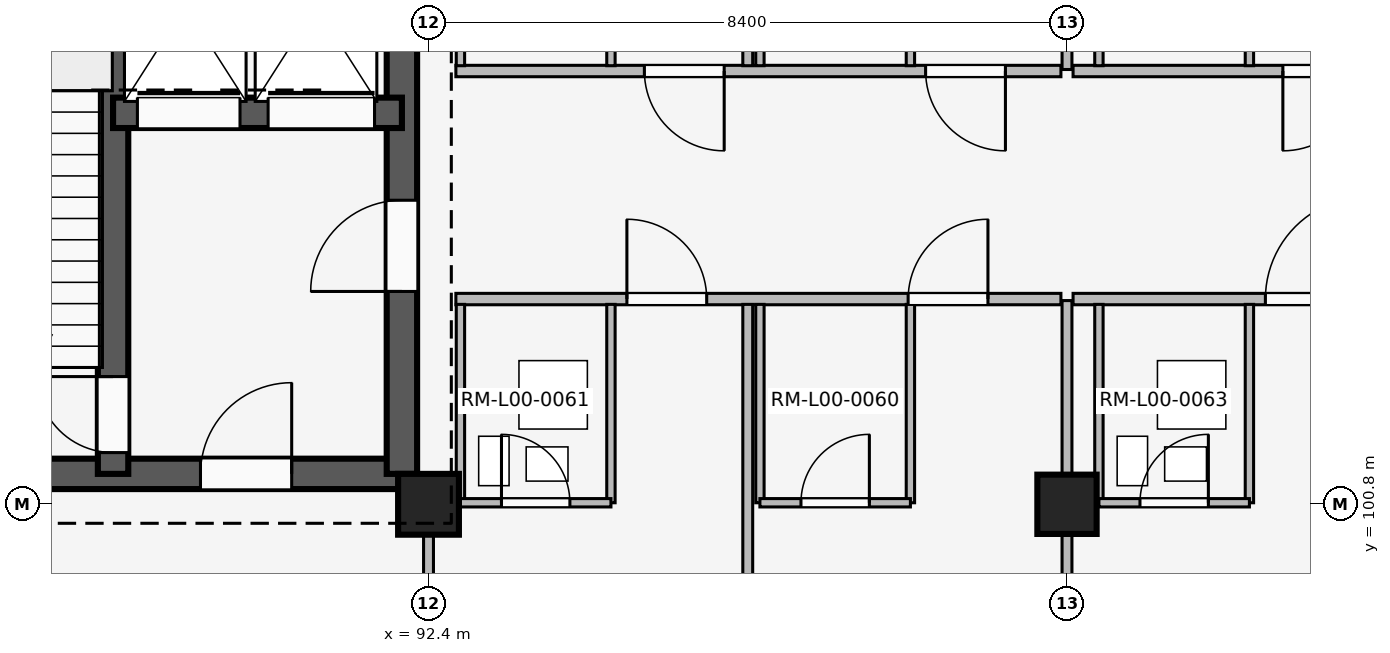
"""IFC4 building model, lengths in metres.
Left out: names, types, materials, properties, quantities, classifications, styles, units other than length and angle.
Written with IfcOpenShell. Run it as: python <this file> out.ifc"""

import sys

from ifc_helpers import new_model, si_unit, direction, frame, frame_2d, origin, origin_2d, place, context, subcontext, project, spatial, rectangle, extrude, element, fill, save


model = new_model("IFC4")
c1 = context("Model", 3, precision=1e-05, world=origin(), true_north=direction((0.0, 1.0)))
c2 = subcontext(c1, "Body", "Model", "MODEL_VIEW")
j1 = project(units=[si_unit("LENGTHUNIT", "METRE"), si_unit("PLANEANGLEUNIT", "RADIAN")], contexts=[c1])
p1 = place(None, origin())
s1 = spatial("IfcSite", under=j1, at=p1, CompositionType="ELEMENT")
p2 = place(p1, origin())
s2 = spatial("IfcBuilding", under=s1, at=p2, CompositionType="ELEMENT")
p3 = place(p2, origin())
s3 = spatial("IfcBuildingStorey", under=s2, at=p3, CompositionType="ELEMENT", Elevation=0.0)
p4 = place(p3, frame((92.4, 100.8, 0.0), z_axis=(0.0, 0.0, 1.0), x_axis=(1.0, 0.0, 0.0)))
e1 = element("IfcColumn", 1, at=p4, inside=s3, PredefinedType="COLUMN", context=c2, shape_type="SweptSolid", body=[
    extrude(rectangle(XDim=0.8, YDim=0.8, at=origin_2d()), origin(), (0.0, 0.0, 1.0), 4.8),
])
p5 = place(p3, frame((100.8, 100.8, 0.0), z_axis=(0.0, 0.0, 1.0), x_axis=(1.0, 0.0, 0.0)))
e2 = element("IfcColumn", 2, at=p5, inside=s3, PredefinedType="COLUMN", context=c2, shape_type="SweptSolid", body=[
    extrude(rectangle(XDim=0.78, YDim=0.78, at=origin_2d()), origin(), (0.0, 0.0, 1.0), 4.8),
])
p6 = place(p3, frame((84.55, 101.2, 0.0), z_axis=(0.0, 0.0, 1.0), x_axis=(1.0, 0.0, 0.0)))
e3 = element("IfcWall", 3, at=p6, inside=s3, PredefinedType="SHEAR", context=c2, shape_type="SweptSolid", body=[
    extrude(rectangle(XDim=7.5, YDim=0.4, at=frame_2d((3.75, 0.0))), origin(), (0.0, 0.0, 1.0), 4.52),
])
p7 = place(p6, frame((4.85, 0.0, 0.0)))
e4 = element("IfcOpeningElement", 4, at=p7, cuts=e3, PredefinedType="OPENING", context=c2, shape_type="SweptSolid", body=[
    extrude(rectangle(XDim=1.2, YDim=2.2, at=frame_2d((0.6, 1.1))), frame((0.0, 0.21, 0.0), z_axis=(0.0, -1.0, 0.0), x_axis=(1.0, 0.0, 0.0)), (0.0, 0.0, 1.0), 0.42),
])
p8 = place(p3, frame((92.05, 101.2, 0.0), z_axis=(0.0, 0.0, 1.0), x_axis=(0.0, 1.0, 0.0)))
e5 = element("IfcWall", 5, at=p8, inside=s3, PredefinedType="SHEAR", context=c2, shape_type="SweptSolid", body=[
    extrude(rectangle(XDim=7.55, YDim=0.4, at=frame_2d((3.775, 0.0))), origin(), (0.0, 0.0, 1.0), 4.52),
])
p9 = place(p8, frame((2.4, 0.0, 0.0)))
e6 = element("IfcOpeningElement", 6, at=p9, cuts=e5, PredefinedType="OPENING", context=c2, shape_type="SweptSolid", body=[
    extrude(rectangle(XDim=1.2, YDim=2.2, at=frame_2d((0.6, 1.1))), frame((0.0, 0.21, 0.0), z_axis=(0.0, -1.0, 0.0), x_axis=(1.0, 0.0, 0.0)), (0.0, 0.0, 1.0), 0.42),
])
p10 = place(p3, frame((88.25, 101.2, 0.0), z_axis=(0.0, 0.0, 1.0), x_axis=(0.0, 1.0, 0.0)))
e7 = element("IfcWall", 7, at=p10, inside=s3, PredefinedType="SHEAR", context=c2, shape_type="SweptSolid", body=[
    extrude(rectangle(XDim=7.55, YDim=0.4, at=frame_2d((3.775, 0.0))), origin(), (0.0, 0.0, 1.0), 4.52),
])
p11 = place(p10, frame((0.28, 0.0, 0.0)))
e8 = element("IfcOpeningElement", 8, at=p11, cuts=e7, PredefinedType="OPENING", context=c2, shape_type="SweptSolid", body=[
    extrude(rectangle(XDim=1.0, YDim=2.15, at=frame_2d((0.5, 1.075))), frame((0.0, 0.21, 0.0), z_axis=(0.0, -1.0, 0.0), x_axis=(1.0, 0.0, 0.0)), (0.0, 0.0, 1.0), 0.42),
])
p12 = place(p3, frame((88.25, 105.95, 0.0), z_axis=(0.0, 0.0, 1.0), x_axis=(1.0, 0.0, 0.0)))
e9 = element("IfcWall", 9, at=p12, inside=s3, PredefinedType="SHEAR", context=c2, shape_type="SweptSolid", body=[
    extrude(rectangle(XDim=3.8, YDim=0.4, at=frame_2d((1.9, 0.0))), origin(), (0.0, 0.0, 1.0), 4.52),
])
p13 = place(p12, frame((0.32, 0.0, 0.0)))
e10 = element("IfcOpeningElement", 10, at=p13, cuts=e9, PredefinedType="OPENING", context=c2, shape_type="SweptSolid", body=[
    extrude(rectangle(XDim=1.35, YDim=2.25, at=frame_2d((0.675, 1.125))), frame((0.0, 0.21, 0.0), z_axis=(0.0, -1.0, 0.0), x_axis=(1.0, 0.0, 0.0)), (0.0, 0.0, 1.0), 0.42),
])
p14 = place(p12, frame((2.04, 0.0, 0.0)))
e11 = element("IfcOpeningElement", 11, at=p14, cuts=e9, PredefinedType="OPENING", context=c2, shape_type="SweptSolid", body=[
    extrude(rectangle(XDim=1.4, YDim=2.25, at=frame_2d((0.7, 1.125))), frame((0.0, 0.21, 0.0), z_axis=(0.0, -1.0, 0.0), x_axis=(1.0, 0.0, 0.0)), (0.0, 0.0, 1.0), 0.42),
])
p15 = place(p3, frame((92.4, 92.54, 0.0), z_axis=(0.0, 0.0, 1.0), x_axis=(0.0, 1.0, 0.0)))
e12 = element("IfcWall", 12, at=p15, inside=s3, PredefinedType="PARTITIONING", context=c2, shape_type="SweptSolid", body=[
    extrude(rectangle(XDim=8.21, YDim=0.13, at=frame_2d((4.105, 0.0))), origin(), (0.0, 0.0, 1.0), 3.8),
])
p16 = place(p15, frame((3.64, 0.0, 0.0)))
e13 = element("IfcOpeningElement", 13, at=p16, cuts=e12, PredefinedType="OPENING", context=c2, shape_type="SweptSolid", body=[
    extrude(rectangle(XDim=1.08, YDim=2.15, at=frame_2d((0.54, 1.075))), frame((0.0, 0.075, 0.0), z_axis=(0.0, -1.0, 0.0), x_axis=(1.0, 0.0, 0.0)), (0.0, 0.0, 1.0), 0.15),
])
p17 = place(p3, frame((92.76, 103.5, 0.0), z_axis=(0.0, 0.0, 1.0), x_axis=(1.0, 0.0, 0.0)))
e14 = element("IfcWall", 14, at=p17, inside=s3, PredefinedType="PARTITIONING", context=c2, shape_type="SweptSolid", body=[
    extrude(rectangle(XDim=7.96, YDim=0.15, at=frame_2d((3.98, 0.0))), origin(), (0.0, 0.0, 1.0), 3.8),
])
p18 = place(p17, frame((2.25, 0.0, 0.0)))
e15 = element("IfcOpeningElement", 15, at=p18, cuts=e14, PredefinedType="OPENING", context=c2, shape_type="SweptSolid", body=[
    extrude(rectangle(XDim=1.05, YDim=2.2, at=frame_2d((0.525, 1.1))), frame((0.0, 0.085, 0.0), z_axis=(0.0, -1.0, 0.0), x_axis=(1.0, 0.0, 0.0)), (0.0, 0.0, 1.0), 0.17),
])
p19 = place(p17, frame((5.95, 0.0, 0.0)))
e16 = element("IfcOpeningElement", 16, at=p19, cuts=e14, PredefinedType="OPENING", context=c2, shape_type="SweptSolid", body=[
    extrude(rectangle(XDim=1.05, YDim=2.2, at=frame_2d((0.525, 1.1))), frame((0.0, 0.085, 0.0), z_axis=(0.0, -1.0, 0.0), x_axis=(1.0, 0.0, 0.0)), (0.0, 0.0, 1.0), 0.17),
])
p20 = place(p3, frame((96.6, 92.5, 0.0), z_axis=(0.0, 0.0, 1.0), x_axis=(0.0, 1.0, 0.0)))
e17 = element("IfcWall", 17, at=p20, inside=s3, PredefinedType="PARTITIONING", context=c2, shape_type="SweptSolid", body=[
    extrude(rectangle(XDim=10.93, YDim=0.13, at=frame_2d((5.465, 0.0))), origin(), (0.0, 0.0, 1.0), 3.8),
])
for number, where, z_axis, x_axis in (
    (18, (92.82, 100.82, 0.0), (0.0, 0.0, 1.0), (0.0, 1.0, 0.0)),
    (19, (94.8, 100.82, 0.0), (0.0, 0.0, 1.0), (0.0, 1.0, 0.0)),
):
    element("IfcWall", number, at=place(p3, frame(where, z_axis=z_axis, x_axis=x_axis)), inside=s3, PredefinedType="PARTITIONING", context=c2, shape_type="SweptSolid", body=[
        extrude(rectangle(XDim=2.61, YDim=0.11, at=frame_2d((1.305, 0.0))), origin(), (0.0, 0.0, 1.0), 3.8),
    ])
p21 = place(p3, frame((92.82, 100.82, 0.0), z_axis=(0.0, 0.0, 1.0), x_axis=(1.0, 0.0, 0.0)))
e20 = element("IfcWall", 20, at=p21, inside=s3, PredefinedType="PARTITIONING", context=c2, shape_type="SweptSolid", body=[
    extrude(rectangle(XDim=1.98, YDim=0.11, at=frame_2d((0.99, 0.0))), origin(), (0.0, 0.0, 1.0), 3.8),
])
p22 = place(p21, frame((0.54, 0.0, 0.0)))
e21 = element("IfcOpeningElement", 21, at=p22, cuts=e20, PredefinedType="OPENING", context=c2, shape_type="SweptSolid", body=[
    extrude(rectangle(XDim=0.9, YDim=2.1, at=frame_2d((0.45, 1.05))), frame((0.0, 0.065, 0.0), z_axis=(0.0, -1.0, 0.0), x_axis=(1.0, 0.0, 0.0)), (0.0, 0.0, 1.0), 0.13),
])
for number, where, z_axis, x_axis in (
    (22, (96.76, 100.82, 0.0), (0.0, 0.0, 1.0), (0.0, 1.0, 0.0)),
    (23, (98.74, 100.82, 0.0), (0.0, 0.0, 1.0), (0.0, 1.0, 0.0)),
):
    element("IfcWall", number, at=place(p3, frame(where, z_axis=z_axis, x_axis=x_axis)), inside=s3, PredefinedType="PARTITIONING", context=c2, shape_type="SweptSolid", body=[
        extrude(rectangle(XDim=2.61, YDim=0.11, at=frame_2d((1.305, 0.0))), origin(), (0.0, 0.0, 1.0), 3.8),
    ])
p23 = place(p3, frame((96.76, 100.82, 0.0), z_axis=(0.0, 0.0, 1.0), x_axis=(1.0, 0.0, 0.0)))
e24 = element("IfcWall", 24, at=p23, inside=s3, PredefinedType="PARTITIONING", context=c2, shape_type="SweptSolid", body=[
    extrude(rectangle(XDim=1.98, YDim=0.11, at=frame_2d((0.99, 0.0))), origin(), (0.0, 0.0, 1.0), 3.8),
])
p24 = place(p23, frame((0.54, 0.0, 0.0)))
e25 = element("IfcOpeningElement", 25, at=p24, cuts=e24, PredefinedType="OPENING", context=c2, shape_type="SweptSolid", body=[
    extrude(rectangle(XDim=0.9, YDim=2.1, at=frame_2d((0.45, 1.05))), frame((0.0, 0.065, 0.0), z_axis=(0.0, -1.0, 0.0), x_axis=(1.0, 0.0, 0.0)), (0.0, 0.0, 1.0), 0.13),
])
p25 = place(p3, frame((100.72, 106.5, 0.0), z_axis=(0.0, 0.0, 1.0), x_axis=(-1.0, 0.0, 0.0)))
e26 = element("IfcWall", 26, at=p25, inside=s3, PredefinedType="PARTITIONING", context=c2, shape_type="SweptSolid", body=[
    extrude(rectangle(XDim=7.96, YDim=0.15, at=frame_2d((3.98, 0.0))), origin(), (0.0, 0.0, 1.0), 3.8),
])
p26 = place(p25, frame((0.73, 0.0, 0.0)))
e27 = element("IfcOpeningElement", 27, at=p26, cuts=e26, PredefinedType="OPENING", context=c2, shape_type="SweptSolid", body=[
    extrude(rectangle(XDim=1.05, YDim=2.2, at=frame_2d((0.525, 1.1))), frame((0.0, 0.085, 0.0), z_axis=(0.0, -1.0, 0.0), x_axis=(1.0, 0.0, 0.0)), (0.0, 0.0, 1.0), 0.17),
])
p27 = place(p25, frame((4.43, 0.0, 0.0)))
e28 = element("IfcOpeningElement", 28, at=p27, cuts=e26, PredefinedType="OPENING", context=c2, shape_type="SweptSolid", body=[
    extrude(rectangle(XDim=1.05, YDim=2.2, at=frame_2d((0.525, 1.1))), frame((0.0, 0.085, 0.0), z_axis=(0.0, -1.0, 0.0), x_axis=(1.0, 0.0, 0.0)), (0.0, 0.0, 1.0), 0.17),
])
p28 = place(p3, frame((96.6, 106.57, 0.0), z_axis=(0.0, 0.0, 1.0), x_axis=(0.0, 1.0, 0.0)))
e29 = element("IfcWall", 29, at=p28, inside=s3, PredefinedType="PARTITIONING", context=c2, shape_type="SweptSolid", body=[
    extrude(rectangle(XDim=10.93, YDim=0.13, at=frame_2d((5.465, 0.0))), origin(), (0.0, 0.0, 1.0), 3.8),
])
for number, where, z_axis, x_axis in (
    (30, (92.82, 106.57, 0.0), (0.0, 0.0, 1.0), (0.0, 1.0, 0.0)),
    (31, (94.8, 106.57, 0.0), (0.0, 0.0, 1.0), (0.0, 1.0, 0.0)),
    (32, (96.76, 106.57, 0.0), (0.0, 0.0, 1.0), (0.0, 1.0, 0.0)),
    (33, (98.74, 106.57, 0.0), (0.0, 0.0, 1.0), (0.0, 1.0, 0.0)),
):
    element("IfcWall", number, at=place(p3, frame(where, z_axis=z_axis, x_axis=x_axis)), inside=s3, PredefinedType="PARTITIONING", context=c2, shape_type="SweptSolid", body=[
        extrude(rectangle(XDim=2.61, YDim=0.11, at=frame_2d((1.305, 0.0))), origin(), (0.0, 0.0, 1.0), 3.8),
    ])
for number, where, z_axis, x_axis in (
    (34, (100.8, 92.54, 0.0), (0.0, 0.0, 1.0), (0.0, 1.0, 0.0)),
    (35, (100.8, 106.52, 0.0), (0.0, 0.0, 1.0), (0.0, 1.0, 0.0)),
):
    element("IfcWall", number, at=place(p3, frame(where, z_axis=z_axis, x_axis=x_axis)), inside=s3, PredefinedType="PARTITIONING", context=c2, shape_type="SweptSolid", body=[
        extrude(rectangle(XDim=10.94, YDim=0.13, at=frame_2d((5.47, 0.0))), origin(), (0.0, 0.0, 1.0), 3.8),
    ])
p29 = place(p3, frame((100.88, 103.5, 0.0), z_axis=(0.0, 0.0, 1.0), x_axis=(1.0, 0.0, 0.0)))
e36 = element("IfcWall", 36, at=p29, inside=s3, PredefinedType="PARTITIONING", context=c2, shape_type="SweptSolid", body=[
    extrude(rectangle(XDim=8.24, YDim=0.15, at=frame_2d((4.12, 0.0))), origin(), (0.0, 0.0, 1.0), 3.8),
])
p30 = place(p29, frame((2.53, 0.0, 0.0)))
e37 = element("IfcOpeningElement", 37, at=p30, cuts=e36, PredefinedType="OPENING", context=c2, shape_type="SweptSolid", body=[
    extrude(rectangle(XDim=1.35, YDim=2.25, at=frame_2d((0.675, 1.125))), frame((0.0, 0.085, 0.0), z_axis=(0.0, -1.0, 0.0), x_axis=(1.0, 0.0, 0.0)), (0.0, 0.0, 1.0), 0.17),
])
p31 = place(p29, frame((6.23, 0.0, 0.0)))
e38 = element("IfcOpeningElement", 38, at=p31, cuts=e36, PredefinedType="OPENING", context=c2, shape_type="SweptSolid", body=[
    extrude(rectangle(XDim=1.35, YDim=2.25, at=frame_2d((0.675, 1.125))), frame((0.0, 0.085, 0.0), z_axis=(0.0, -1.0, 0.0), x_axis=(1.0, 0.0, 0.0)), (0.0, 0.0, 1.0), 0.17),
])
for number, where, z_axis, x_axis in (
    (39, (101.22, 100.82, 0.0), (0.0, 0.0, 1.0), (0.0, 1.0, 0.0)),
    (40, (103.2, 100.82, 0.0), (0.0, 0.0, 1.0), (0.0, 1.0, 0.0)),
):
    element("IfcWall", number, at=place(p3, frame(where, z_axis=z_axis, x_axis=x_axis)), inside=s3, PredefinedType="PARTITIONING", context=c2, shape_type="SweptSolid", body=[
        extrude(rectangle(XDim=2.61, YDim=0.11, at=frame_2d((1.305, 0.0))), origin(), (0.0, 0.0, 1.0), 3.8),
    ])
p32 = place(p3, frame((101.22, 100.82, 0.0), z_axis=(0.0, 0.0, 1.0), x_axis=(1.0, 0.0, 0.0)))
e41 = element("IfcWall", 41, at=p32, inside=s3, PredefinedType="PARTITIONING", context=c2, shape_type="SweptSolid", body=[
    extrude(rectangle(XDim=1.98, YDim=0.11, at=frame_2d((0.99, 0.0))), origin(), (0.0, 0.0, 1.0), 3.8),
])
p33 = place(p32, frame((0.54, 0.0, 0.0)))
e42 = element("IfcOpeningElement", 42, at=p33, cuts=e41, PredefinedType="OPENING", context=c2, shape_type="SweptSolid", body=[
    extrude(rectangle(XDim=0.9, YDim=2.1, at=frame_2d((0.45, 1.05))), frame((0.0, 0.065, 0.0), z_axis=(0.0, -1.0, 0.0), x_axis=(1.0, 0.0, 0.0)), (0.0, 0.0, 1.0), 0.13),
])
p34 = place(p3, frame((109.12, 106.5, 0.0), z_axis=(0.0, 0.0, 1.0), x_axis=(-1.0, 0.0, 0.0)))
e43 = element("IfcWall", 43, at=p34, inside=s3, PredefinedType="PARTITIONING", context=c2, shape_type="SweptSolid", body=[
    extrude(rectangle(XDim=8.24, YDim=0.15, at=frame_2d((4.12, 0.0))), origin(), (0.0, 0.0, 1.0), 3.8),
])
p35 = place(p34, frame((0.73, 0.0, 0.0)))
e44 = element("IfcOpeningElement", 44, at=p35, cuts=e43, PredefinedType="OPENING", context=c2, shape_type="SweptSolid", body=[
    extrude(rectangle(XDim=1.05, YDim=2.2, at=frame_2d((0.525, 1.1))), frame((0.0, 0.085, 0.0), z_axis=(0.0, -1.0, 0.0), x_axis=(1.0, 0.0, 0.0)), (0.0, 0.0, 1.0), 0.17),
])
p36 = place(p34, frame((4.43, 0.0, 0.0)))
e45 = element("IfcOpeningElement", 45, at=p36, cuts=e43, PredefinedType="OPENING", context=c2, shape_type="SweptSolid", body=[
    extrude(rectangle(XDim=1.05, YDim=2.2, at=frame_2d((0.525, 1.1))), frame((0.0, 0.085, 0.0), z_axis=(0.0, -1.0, 0.0), x_axis=(1.0, 0.0, 0.0)), (0.0, 0.0, 1.0), 0.17),
])
for number, where, z_axis, x_axis in (
    (46, (101.22, 106.57, 0.0), (0.0, 0.0, 1.0), (0.0, 1.0, 0.0)),
    (47, (103.2, 106.57, 0.0), (0.0, 0.0, 1.0), (0.0, 1.0, 0.0)),
):
    element("IfcWall", number, at=place(p3, frame(where, z_axis=z_axis, x_axis=x_axis)), inside=s3, PredefinedType="PARTITIONING", context=c2, shape_type="SweptSolid", body=[
        extrude(rectangle(XDim=2.61, YDim=0.11, at=frame_2d((1.305, 0.0))), origin(), (0.0, 0.0, 1.0), 3.8),
    ])
p37 = place(p9, origin())
e48 = element("IfcDoor", 48, at=p37, inside=s3, OperationType="SINGLE_SWING_LEFT", PredefinedType="DOOR", context=c2, shape_type="SweptSolid", body=[
    extrude(rectangle(XDim=1.2, YDim=2.2, at=frame_2d((0.6, 1.1))), frame((0.0, 0.025, 0.0), z_axis=(0.0, -1.0, 0.0), x_axis=(1.0, 0.0, 0.0)), (0.0, 0.0, 1.0), 0.05),
])
fill(e6, e48)
p38 = place(p7, origin())
e49 = element("IfcDoor", 49, at=p38, inside=s3, OperationType="SINGLE_SWING_RIGHT", PredefinedType="DOOR", context=c2, shape_type="SweptSolid", body=[
    extrude(rectangle(XDim=1.2, YDim=2.2, at=frame_2d((0.6, 1.1))), frame((0.0, 0.025, 0.0), z_axis=(0.0, -1.0, 0.0), x_axis=(1.0, 0.0, 0.0)), (0.0, 0.0, 1.0), 0.05),
])
fill(e4, e49)
p39 = place(p11, origin())
e50 = element("IfcDoor", 50, at=p39, inside=s3, OperationType="SINGLE_SWING_RIGHT", PredefinedType="DOOR", context=c2, shape_type="SweptSolid", body=[
    extrude(rectangle(XDim=1.0, YDim=2.15, at=frame_2d((0.5, 1.075))), frame((0.0, 0.025, 0.0), z_axis=(0.0, -1.0, 0.0), x_axis=(1.0, 0.0, 0.0)), (0.0, 0.0, 1.0), 0.05),
])
fill(e8, e50)
p40 = place(p13, origin())
e51 = element("IfcDoor", 51, at=p40, inside=s3, OperationType="SLIDING_TO_LEFT", PredefinedType="DOOR", context=c2, shape_type="SweptSolid", body=[
    extrude(rectangle(XDim=1.35, YDim=2.25, at=frame_2d((0.675, 1.125))), frame((0.0, 0.025, 0.0), z_axis=(0.0, -1.0, 0.0), x_axis=(1.0, 0.0, 0.0)), (0.0, 0.0, 1.0), 0.05),
])
fill(e10, e51)
p41 = place(p14, origin())
e52 = element("IfcDoor", 52, at=p41, inside=s3, OperationType="SLIDING_TO_LEFT", PredefinedType="DOOR", context=c2, shape_type="SweptSolid", body=[
    extrude(rectangle(XDim=1.4, YDim=2.25, at=frame_2d((0.7, 1.125))), frame((0.0, 0.025, 0.0), z_axis=(0.0, -1.0, 0.0), x_axis=(1.0, 0.0, 0.0)), (0.0, 0.0, 1.0), 0.05),
])
fill(e11, e52)
p42 = place(p18, origin())
e53 = element("IfcDoor", 53, at=p42, inside=s3, OperationType="SINGLE_SWING_LEFT", PredefinedType="DOOR", context=c2, shape_type="SweptSolid", body=[
    extrude(rectangle(XDim=1.05, YDim=2.2, at=frame_2d((0.525, 1.1))), frame((0.0, 0.025, 0.0), z_axis=(0.0, -1.0, 0.0), x_axis=(1.0, 0.0, 0.0)), (0.0, 0.0, 1.0), 0.05),
])
fill(e15, e53)
p43 = place(p19, origin())
e54 = element("IfcDoor", 54, at=p43, inside=s3, OperationType="SINGLE_SWING_RIGHT", PredefinedType="DOOR", context=c2, shape_type="SweptSolid", body=[
    extrude(rectangle(XDim=1.05, YDim=2.2, at=frame_2d((0.525, 1.1))), frame((0.0, 0.025, 0.0), z_axis=(0.0, -1.0, 0.0), x_axis=(1.0, 0.0, 0.0)), (0.0, 0.0, 1.0), 0.05),
])
fill(e16, e54)
p44 = place(p22, origin())
e55 = element("IfcDoor", 55, at=p44, inside=s3, OperationType="SINGLE_SWING_LEFT", PredefinedType="DOOR", context=c2, shape_type="SweptSolid", body=[
    extrude(rectangle(XDim=0.9, YDim=2.1, at=frame_2d((0.45, 1.05))), frame((0.0, 0.025, 0.0), z_axis=(0.0, -1.0, 0.0), x_axis=(1.0, 0.0, 0.0)), (0.0, 0.0, 1.0), 0.05),
])
fill(e21, e55)
p45 = place(p24, origin())
e56 = element("IfcDoor", 56, at=p45, inside=s3, OperationType="SINGLE_SWING_RIGHT", PredefinedType="DOOR", context=c2, shape_type="SweptSolid", body=[
    extrude(rectangle(XDim=0.9, YDim=2.1, at=frame_2d((0.45, 1.05))), frame((0.0, 0.025, 0.0), z_axis=(0.0, -1.0, 0.0), x_axis=(1.0, 0.0, 0.0)), (0.0, 0.0, 1.0), 0.05),
])
fill(e25, e56)
p46 = place(p26, origin())
e57 = element("IfcDoor", 57, at=p46, inside=s3, OperationType="SINGLE_SWING_LEFT", PredefinedType="DOOR", context=c2, shape_type="SweptSolid", body=[
    extrude(rectangle(XDim=1.05, YDim=2.2, at=frame_2d((0.525, 1.1))), frame((0.0, 0.025, 0.0), z_axis=(0.0, -1.0, 0.0), x_axis=(1.0, 0.0, 0.0)), (0.0, 0.0, 1.0), 0.05),
])
fill(e27, e57)
p47 = place(p27, origin())
e58 = element("IfcDoor", 58, at=p47, inside=s3, OperationType="SINGLE_SWING_LEFT", PredefinedType="DOOR", context=c2, shape_type="SweptSolid", body=[
    extrude(rectangle(XDim=1.05, YDim=2.2, at=frame_2d((0.525, 1.1))), frame((0.0, 0.025, 0.0), z_axis=(0.0, -1.0, 0.0), x_axis=(1.0, 0.0, 0.0)), (0.0, 0.0, 1.0), 0.05),
])
fill(e28, e58)
p48 = place(p30, origin())
e59 = element("IfcDoor", 59, at=p48, inside=s3, OperationType="SINGLE_SWING_RIGHT", PredefinedType="DOOR", context=c2, shape_type="SweptSolid", body=[
    extrude(rectangle(XDim=1.35, YDim=2.25, at=frame_2d((0.675, 1.125))), frame((0.0, 0.025, 0.0), z_axis=(0.0, -1.0, 0.0), x_axis=(1.0, 0.0, 0.0)), (0.0, 0.0, 1.0), 0.05),
])
fill(e37, e59)
p49 = place(p33, origin())
e60 = element("IfcDoor", 60, at=p49, inside=s3, OperationType="SINGLE_SWING_RIGHT", PredefinedType="DOOR", context=c2, shape_type="SweptSolid", body=[
    extrude(rectangle(XDim=0.9, YDim=2.1, at=frame_2d((0.45, 1.05))), frame((0.0, 0.025, 0.0), z_axis=(0.0, -1.0, 0.0), x_axis=(1.0, 0.0, 0.0)), (0.0, 0.0, 1.0), 0.05),
])
fill(e42, e60)
p50 = place(p36, origin())
e61 = element("IfcDoor", 61, at=p50, inside=s3, OperationType="SINGLE_SWING_RIGHT", PredefinedType="DOOR", context=c2, shape_type="SweptSolid", body=[
    extrude(rectangle(XDim=1.05, YDim=2.2, at=frame_2d((0.525, 1.1))), frame((0.0, 0.025, 0.0), z_axis=(0.0, -1.0, 0.0), x_axis=(1.0, 0.0, 0.0)), (0.0, 0.0, 1.0), 0.05),
])
fill(e45, e61)
save(model, sys.argv[1])
